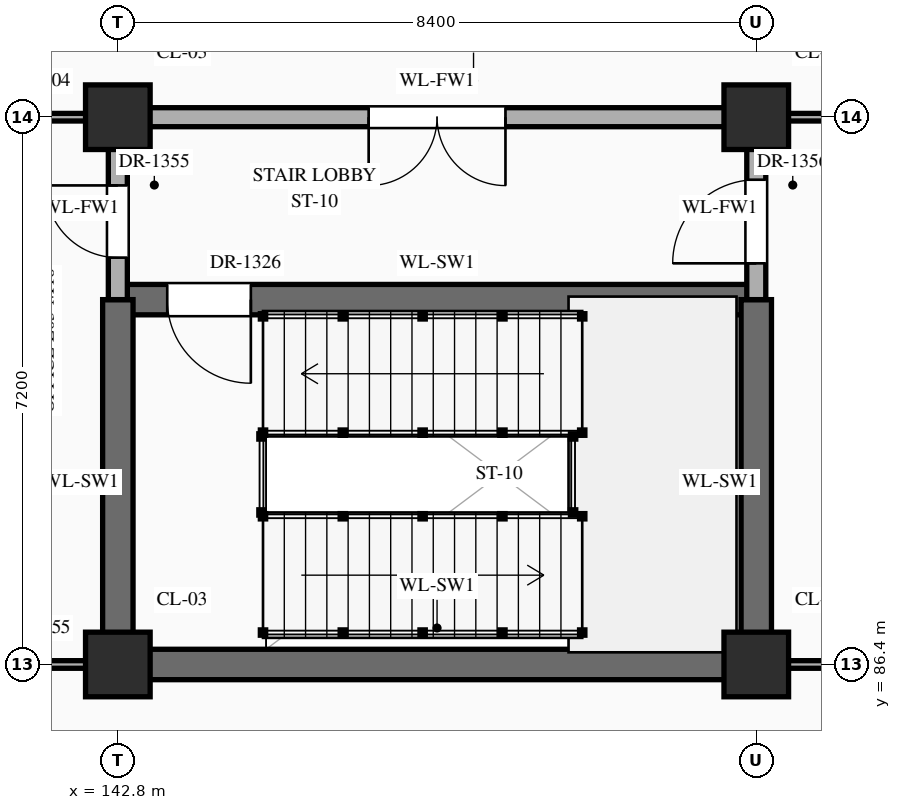
"""IFC4 building model, lengths in metres.
Left out: names, types, materials, properties, quantities, classifications, styles, units other than length and angle.
Written with IfcOpenShell. Run it as: python <this file> out.ifc"""

import sys

from ifc_helpers import new_model, si_unit, direction, frame, frame_2d, origin, origin_2d, place, context, subcontext, project, spatial, rectangle, extrude, element, fill, save


model = new_model("IFC4")
c1 = context("Model", 3, precision=1e-05, world=origin(), true_north=direction((0.0, 1.0)))
c2 = subcontext(c1, "Body", "Model", "MODEL_VIEW")
j1 = project(units=[si_unit("LENGTHUNIT", "METRE"), si_unit("PLANEANGLEUNIT", "RADIAN")], contexts=[c1])
p1 = place(None, origin())
s1 = spatial("IfcSite", under=j1, at=p1, CompositionType="ELEMENT")
p2 = place(p1, origin())
s2 = spatial("IfcBuilding", under=s1, at=p2, CompositionType="ELEMENT")
p3 = place(p2, frame((0.0, 0.0, 10.8)))
s3 = spatial("IfcBuildingStorey", under=s2, at=p3, CompositionType="ELEMENT", Elevation=10.8)
for number, where, z_axis, x_axis in (
    (1, (142.8, 86.4, 0.0), (0.0, 0.0, 1.0), (1.0, 0.0, 0.0)),
    (2, (142.8, 93.6, 0.0), (0.0, 0.0, 1.0), (1.0, 0.0, 0.0)),
    (3, (151.2, 86.4, 0.0), (0.0, 0.0, 1.0), (1.0, 0.0, 0.0)),
    (4, (151.2, 93.6, 0.0), (0.0, 0.0, 1.0), (1.0, 0.0, 0.0)),
):
    element("IfcColumn", number, at=place(p3, frame(where, z_axis=z_axis, x_axis=x_axis)), inside=s3, PredefinedType="COLUMN", context=c2, shape_type="SweptSolid", body=[
        extrude(rectangle(XDim=0.85, YDim=0.85, at=origin_2d()), origin(), (0.0, 0.0, 1.0), 5.4),
    ])
p4 = place(p3, frame((126.0, 86.4, 0.0), z_axis=(0.0, 0.0, 1.0), x_axis=(1.0, 0.0, 0.0)))
e5 = element("IfcWall", 5, at=p4, inside=s3, PredefinedType="STANDARD", context=c2, shape_type="SweptSolid", body=[
    extrude(rectangle(XDim=16.8, YDim=0.1, at=frame_2d((8.4, 0.0))), origin(), (0.0, 0.0, 1.0), 4.27),
])
p5 = place(p4, frame((3.66, 0.0, 0.0)))
e6 = element("IfcOpeningElement", 6, at=p5, cuts=e5, PredefinedType="OPENING", context=c2, shape_type="SweptSolid", body=[
    extrude(rectangle(XDim=1.08, YDim=2.25, at=frame_2d((0.54, 1.125))), frame((0.0, 0.062, 0.0), z_axis=(0.0, -1.0, 0.0), x_axis=(1.0, 0.0, 0.0)), (0.0, 0.0, 1.0), 0.124),
])
p6 = place(p4, frame((9.393, 0.0, 0.0)))
e7 = element("IfcOpeningElement", 7, at=p6, cuts=e5, PredefinedType="OPENING", context=c2, shape_type="SweptSolid", body=[
    extrude(rectangle(XDim=1.16, YDim=2.3, at=frame_2d((0.58, 1.15))), frame((0.0, 0.062, 0.0), z_axis=(0.0, -1.0, 0.0), x_axis=(1.0, 0.0, 0.0)), (0.0, 0.0, 1.0), 0.124),
])
p7 = place(p4, frame((11.75, 0.0, 0.0)))
e8 = element("IfcOpeningElement", 8, at=p7, cuts=e5, PredefinedType="OPENING", context=c2, shape_type="SweptSolid", body=[
    extrude(rectangle(XDim=1.7, YDim=2.45, at=frame_2d((0.85, 1.225))), frame((0.0, 0.062, 0.0), z_axis=(0.0, -1.0, 0.0), x_axis=(1.0, 0.0, 0.0)), (0.0, 0.0, 1.0), 0.124),
])
p8 = place(p4, frame((14.587, 0.0, 0.0)))
e9 = element("IfcOpeningElement", 9, at=p8, cuts=e5, PredefinedType="OPENING", context=c2, shape_type="SweptSolid", body=[
    extrude(rectangle(XDim=1.28, YDim=2.35, at=frame_2d((0.64, 1.175))), frame((0.0, 0.062, 0.0), z_axis=(0.0, -1.0, 0.0), x_axis=(1.0, 0.0, 0.0)), (0.0, 0.0, 1.0), 0.124),
])
p9 = place(p3, frame((142.8, 86.4, 0.0), z_axis=(0.0, 0.0, 1.0), x_axis=(1.0, 0.0, 0.0)))
e10 = element("IfcWall", 10, at=p9, inside=s3, PredefinedType="SHEAR", context=c2, shape_type="SweptSolid", body=[
    extrude(rectangle(XDim=8.4, YDim=0.4, at=frame_2d((4.2, 0.0))), origin(), (0.0, 0.0, 1.0), 5.12),
])
p10 = place(p3, frame((151.2, 86.4, 0.0), z_axis=(0.0, 0.0, 1.0), x_axis=(1.0, 0.0, 0.0)))
e11 = element("IfcWall", 11, at=p10, inside=s3, PredefinedType="STANDARD", context=c2, shape_type="SweptSolid", body=[
    extrude(rectangle(XDim=16.76, YDim=0.1, at=frame_2d((8.38, 0.0))), origin(), (0.0, 0.0, 1.0), 4.27),
])
p11 = place(p10, frame((3.73, 0.0, 0.0)))
e12 = element("IfcOpeningElement", 12, at=p11, cuts=e11, PredefinedType="OPENING", context=c2, shape_type="SweptSolid", body=[
    extrude(rectangle(XDim=0.94, YDim=2.3, at=frame_2d((0.47, 1.15))), frame((0.0, 0.062, 0.0), z_axis=(0.0, -1.0, 0.0), x_axis=(1.0, 0.0, 0.0)), (0.0, 0.0, 1.0), 0.124),
])
p12 = place(p10, frame((9.462, 0.0, 0.0)))
e13 = element("IfcOpeningElement", 13, at=p12, cuts=e11, PredefinedType="OPENING", context=c2, shape_type="SweptSolid", body=[
    extrude(rectangle(XDim=1.02, YDim=2.4, at=frame_2d((0.51, 1.2))), frame((0.0, 0.062, 0.0), z_axis=(0.0, -1.0, 0.0), x_axis=(1.0, 0.0, 0.0)), (0.0, 0.0, 1.0), 0.124),
])
p13 = place(p10, frame((12.03, 0.0, 0.0)))
e14 = element("IfcOpeningElement", 14, at=p13, cuts=e11, PredefinedType="OPENING", context=c2, shape_type="SweptSolid", body=[
    extrude(rectangle(XDim=1.14, YDim=2.4, at=frame_2d((0.57, 1.2))), frame((0.0, 0.062, 0.0), z_axis=(0.0, -1.0, 0.0), x_axis=(1.0, 0.0, 0.0)), (0.0, 0.0, 1.0), 0.124),
])
p14 = place(p10, frame((14.778, 0.0, 0.0)))
e15 = element("IfcOpeningElement", 15, at=p14, cuts=e11, PredefinedType="OPENING", context=c2, shape_type="SweptSolid", body=[
    extrude(rectangle(XDim=0.9, YDim=2.15, at=frame_2d((0.45, 1.075))), frame((0.0, 0.062, 0.0), z_axis=(0.0, -1.0, 0.0), x_axis=(1.0, 0.0, 0.0)), (0.0, 0.0, 1.0), 0.124),
])
p15 = place(p3, frame((142.8, 91.2, 0.0), z_axis=(0.0, 0.0, 1.0), x_axis=(1.0, 0.0, 0.0)))
e16 = element("IfcWall", 16, at=p15, inside=s3, PredefinedType="SHEAR", context=c2, shape_type="SweptSolid", body=[
    extrude(rectangle(XDim=8.4, YDim=0.4, at=frame_2d((4.2, 0.0))), origin(), (0.0, 0.0, 1.0), 5.12),
])
p16 = place(p15, frame((0.65, 0.0, 0.0)))
e17 = element("IfcOpeningElement", 17, at=p16, cuts=e16, PredefinedType="OPENING", context=c2, shape_type="SweptSolid", body=[
    extrude(rectangle(XDim=1.1, YDim=2.2, at=frame_2d((0.55, 1.1))), frame((0.0, 0.212, 0.0), z_axis=(0.0, -1.0, 0.0), x_axis=(1.0, 0.0, 0.0)), (0.0, 0.0, 1.0), 0.424),
])
p17 = place(p3, frame((126.0, 93.6, 0.0), z_axis=(0.0, 0.0, 1.0), x_axis=(1.0, 0.0, 0.0)))
e18 = element("IfcWall", 18, at=p17, inside=s3, PredefinedType="STANDARD", context=c2, shape_type="SweptSolid", body=[
    extrude(rectangle(XDim=16.8, YDim=0.1, at=frame_2d((8.4, 0.0))), origin(), (0.0, 0.0, 1.0), 4.27),
])
p18 = place(p17, frame((3.62, 0.0, 0.0)))
e19 = element("IfcOpeningElement", 19, at=p18, cuts=e18, PredefinedType="OPENING", context=c2, shape_type="SweptSolid", body=[
    extrude(rectangle(XDim=1.16, YDim=2.3, at=frame_2d((0.58, 1.15))), frame((0.0, 0.062, 0.0), z_axis=(0.0, -1.0, 0.0), x_axis=(1.0, 0.0, 0.0)), (0.0, 0.0, 1.0), 0.124),
])
p19 = place(p17, frame((9.373, 0.0, 0.0)))
e20 = element("IfcOpeningElement", 20, at=p19, cuts=e18, PredefinedType="OPENING", context=c2, shape_type="SweptSolid", body=[
    extrude(rectangle(XDim=1.2, YDim=2.35, at=frame_2d((0.6, 1.175))), frame((0.0, 0.062, 0.0), z_axis=(0.0, -1.0, 0.0), x_axis=(1.0, 0.0, 0.0)), (0.0, 0.0, 1.0), 0.124),
])
p20 = place(p17, frame((11.7, 0.0, 0.0)))
e21 = element("IfcOpeningElement", 21, at=p20, cuts=e18, PredefinedType="OPENING", context=c2, shape_type="SweptSolid", body=[
    extrude(rectangle(XDim=1.8, YDim=2.5, at=frame_2d((0.9, 1.25))), frame((0.0, 0.062, 0.0), z_axis=(0.0, -1.0, 0.0), x_axis=(1.0, 0.0, 0.0)), (0.0, 0.0, 1.0), 0.124),
])
p21 = place(p17, frame((14.587, 0.0, 0.0)))
e22 = element("IfcOpeningElement", 22, at=p21, cuts=e18, PredefinedType="OPENING", context=c2, shape_type="SweptSolid", body=[
    extrude(rectangle(XDim=1.28, YDim=2.35, at=frame_2d((0.64, 1.175))), frame((0.0, 0.062, 0.0), z_axis=(0.0, -1.0, 0.0), x_axis=(1.0, 0.0, 0.0)), (0.0, 0.0, 1.0), 0.124),
])
p22 = place(p3, frame((142.8, 93.6, 0.0), z_axis=(0.0, 0.0, 1.0), x_axis=(1.0, 0.0, 0.0)))
e23 = element("IfcWall", 23, at=p22, inside=s3, PredefinedType="STANDARD", context=c2, shape_type="SweptSolid", body=[
    extrude(rectangle(XDim=8.4, YDim=0.25, at=frame_2d((4.2, 0.0))), origin(), (0.0, 0.0, 1.0), 4.27),
])
p23 = place(p22, frame((3.3, 0.0, 0.0)))
e24 = element("IfcOpeningElement", 24, at=p23, cuts=e23, PredefinedType="OPENING", context=c2, shape_type="SweptSolid", body=[
    extrude(rectangle(XDim=1.8, YDim=2.35, at=frame_2d((0.9, 1.175))), frame((0.0, 0.137, 0.0), z_axis=(0.0, -1.0, 0.0), x_axis=(1.0, 0.0, 0.0)), (0.0, 0.0, 1.0), 0.274),
])
p24 = place(p3, frame((151.2, 93.6, 0.0), z_axis=(0.0, 0.0, 1.0), x_axis=(1.0, 0.0, 0.0)))
e25 = element("IfcWall", 25, at=p24, inside=s3, PredefinedType="STANDARD", context=c2, shape_type="SweptSolid", body=[
    extrude(rectangle(XDim=16.76, YDim=0.1, at=frame_2d((8.38, 0.0))), origin(), (0.0, 0.0, 1.0), 4.27),
])
p25 = place(p24, frame((3.73, 0.0, 0.0)))
e26 = element("IfcOpeningElement", 26, at=p25, cuts=e25, PredefinedType="OPENING", context=c2, shape_type="SweptSolid", body=[
    extrude(rectangle(XDim=0.94, YDim=2.3, at=frame_2d((0.47, 1.15))), frame((0.0, 0.062, 0.0), z_axis=(0.0, -1.0, 0.0), x_axis=(1.0, 0.0, 0.0)), (0.0, 0.0, 1.0), 0.124),
])
p26 = place(p24, frame((9.482, 0.0, 0.0)))
e27 = element("IfcOpeningElement", 27, at=p26, cuts=e25, PredefinedType="OPENING", context=c2, shape_type="SweptSolid", body=[
    extrude(rectangle(XDim=0.98, YDim=2.35, at=frame_2d((0.49, 1.175))), frame((0.0, 0.062, 0.0), z_axis=(0.0, -1.0, 0.0), x_axis=(1.0, 0.0, 0.0)), (0.0, 0.0, 1.0), 0.124),
])
p27 = place(p24, frame((12.09, 0.0, 0.0)))
e28 = element("IfcOpeningElement", 28, at=p27, cuts=e25, PredefinedType="OPENING", context=c2, shape_type="SweptSolid", body=[
    extrude(rectangle(XDim=1.02, YDim=2.4, at=frame_2d((0.51, 1.2))), frame((0.0, 0.062, 0.0), z_axis=(0.0, -1.0, 0.0), x_axis=(1.0, 0.0, 0.0)), (0.0, 0.0, 1.0), 0.124),
])
p28 = place(p24, frame((14.698, 0.0, 0.0)))
e29 = element("IfcOpeningElement", 29, at=p28, cuts=e25, PredefinedType="OPENING", context=c2, shape_type="SweptSolid", body=[
    extrude(rectangle(XDim=1.06, YDim=2.4, at=frame_2d((0.53, 1.2))), frame((0.0, 0.062, 0.0), z_axis=(0.0, -1.0, 0.0), x_axis=(1.0, 0.0, 0.0)), (0.0, 0.0, 1.0), 0.124),
])
p29 = place(p3, frame((142.8, 86.4, 0.0), z_axis=(0.0, 0.0, 1.0), x_axis=(0.0, 1.0, 0.0)))
e30 = element("IfcWall", 30, at=p29, inside=s3, PredefinedType="SHEAR", context=c2, shape_type="SweptSolid", body=[
    extrude(rectangle(XDim=4.8, YDim=0.4, at=frame_2d((2.4, 0.0))), origin(), (0.0, 0.0, 1.0), 5.12),
])
p30 = place(p3, frame((142.8, 91.2, 0.0), z_axis=(0.0, 0.0, 1.0), x_axis=(0.0, 1.0, 0.0)))
e31 = element("IfcWall", 31, at=p30, inside=s3, PredefinedType="STANDARD", context=c2, shape_type="SweptSolid", body=[
    extrude(rectangle(XDim=2.4, YDim=0.25, at=frame_2d((1.2, 0.0))), origin(), (0.0, 0.0, 1.0), 4.37),
])
p31 = place(p30, frame((0.552, 0.0, 0.0)))
e32 = element("IfcOpeningElement", 32, at=p31, cuts=e31, PredefinedType="OPENING", context=c2, shape_type="SweptSolid", body=[
    extrude(rectangle(XDim=0.95, YDim=2.15, at=frame_2d((0.475, 1.075))), frame((0.0, 0.137, 0.0), z_axis=(0.0, -1.0, 0.0), x_axis=(1.0, 0.0, 0.0)), (0.0, 0.0, 1.0), 0.274),
])
p32 = place(p3, frame((151.2, 86.4, 0.0), z_axis=(0.0, 0.0, 1.0), x_axis=(0.0, 1.0, 0.0)))
e33 = element("IfcWall", 33, at=p32, inside=s3, PredefinedType="SHEAR", context=c2, shape_type="SweptSolid", body=[
    extrude(rectangle(XDim=4.8, YDim=0.4, at=frame_2d((2.4, 0.0))), origin(), (0.0, 0.0, 1.0), 5.12),
])
p33 = place(p3, frame((151.2, 91.2, 0.0), z_axis=(0.0, 0.0, 1.0), x_axis=(0.0, 1.0, 0.0)))
e34 = element("IfcWall", 34, at=p33, inside=s3, PredefinedType="STANDARD", context=c2, shape_type="SweptSolid", body=[
    extrude(rectangle(XDim=2.4, YDim=0.25, at=frame_2d((1.2, 0.0))), origin(), (0.0, 0.0, 1.0), 4.37),
])
p34 = place(p33, frame((0.478, 0.0, 0.0)))
e35 = element("IfcOpeningElement", 35, at=p34, cuts=e34, PredefinedType="OPENING", context=c2, shape_type="SweptSolid", body=[
    extrude(rectangle(XDim=1.1, YDim=2.2, at=frame_2d((0.55, 1.1))), frame((0.0, 0.137, 0.0), z_axis=(0.0, -1.0, 0.0), x_axis=(1.0, 0.0, 0.0)), (0.0, 0.0, 1.0), 0.274),
])
p35 = place(p16, frame((1.1, 0.0, 0.0), z_axis=(0.0, 0.0, 1.0), x_axis=(-1.0, 0.0, 0.0)))
e36 = element("IfcDoor", 36, at=p35, inside=s3, OperationType="SINGLE_SWING_LEFT", PredefinedType="DOOR", context=c2, shape_type="SweptSolid", body=[
    extrude(rectangle(XDim=1.1, YDim=2.2, at=frame_2d((0.55, 1.1))), frame((0.0, 0.025, 0.0), z_axis=(0.0, -1.0, 0.0), x_axis=(1.0, 0.0, 0.0)), (0.0, 0.0, 1.0), 0.05),
])
fill(e17, e36)
p36 = place(p23, frame((1.8, 0.0, 0.0), z_axis=(0.0, 0.0, 1.0), x_axis=(-1.0, 0.0, 0.0)))
e37 = element("IfcDoor", 37, at=p36, inside=s3, OperationType="DOUBLE_DOOR_SINGLE_SWING", PredefinedType="DOOR", context=c2, shape_type="SweptSolid", body=[
    extrude(rectangle(XDim=1.8, YDim=2.35, at=frame_2d((0.9, 1.175))), frame((0.0, 0.025, 0.0), z_axis=(0.0, -1.0, 0.0), x_axis=(1.0, 0.0, 0.0)), (0.0, 0.0, 1.0), 0.05),
])
fill(e24, e37)
p37 = place(p31, origin())
e38 = element("IfcDoor", 38, at=p37, inside=s3, OperationType="SINGLE_SWING_RIGHT", PredefinedType="DOOR", context=c2, shape_type="SweptSolid", body=[
    extrude(rectangle(XDim=0.95, YDim=2.15, at=frame_2d((0.475, 1.075))), frame((0.0, 0.025, 0.0), z_axis=(0.0, -1.0, 0.0), x_axis=(1.0, 0.0, 0.0)), (0.0, 0.0, 1.0), 0.05),
])
fill(e32, e38)
p38 = place(p34, origin())
e39 = element("IfcDoor", 39, at=p38, inside=s3, OperationType="SINGLE_SWING_LEFT", PredefinedType="DOOR", context=c2, shape_type="SweptSolid", body=[
    extrude(rectangle(XDim=1.1, YDim=2.2, at=frame_2d((0.55, 1.1))), frame((0.0, 0.025, 0.0), z_axis=(0.0, -1.0, 0.0), x_axis=(1.0, 0.0, 0.0)), (0.0, 0.0, 1.0), 0.05),
])
fill(e35, e39)
save(model, sys.argv[1])
